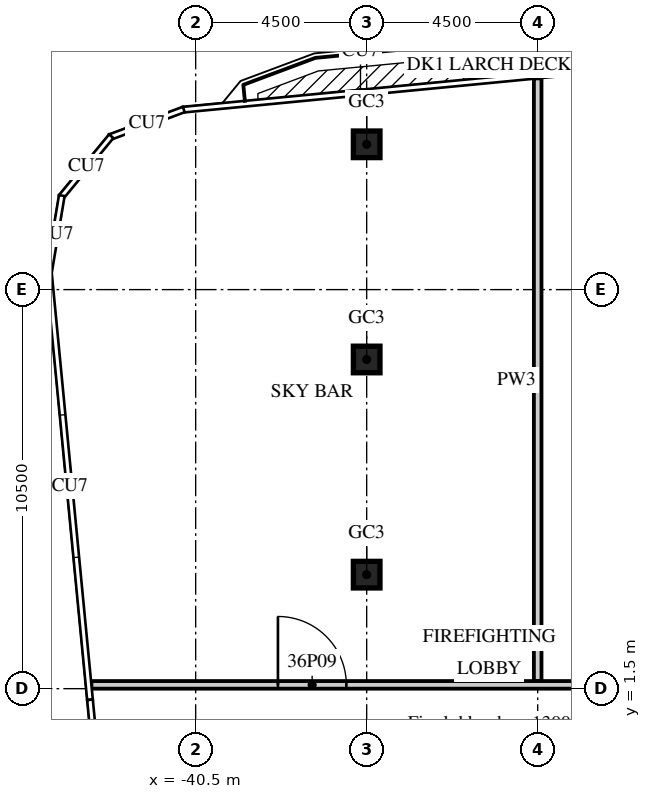
"""IFC4 building model, lengths in metres.
Left out: names, types, materials, properties, quantities, classifications, styles, units other than length and angle.
Written with IfcOpenShell. Run it as: python <this file> out.ifc"""

import sys

from ifc_helpers import new_model, si_unit, direction, frame, frame_2d, origin, origin_2d, place, context, subcontext, project, spatial, rectangle, extrude, element, fill, save


model = new_model("IFC4")
c1 = context("Model", 3, precision=1e-05, world=origin(), true_north=direction((0.0, 1.0)))
c2 = subcontext(c1, "Body", "Model", "MODEL_VIEW")
j1 = project(units=[si_unit("LENGTHUNIT", "METRE"), si_unit("PLANEANGLEUNIT", "RADIAN")], contexts=[c1])
p1 = place(None, origin())
s1 = spatial("IfcSite", under=j1, at=p1, CompositionType="ELEMENT")
p2 = place(p1, origin())
s2 = spatial("IfcBuilding", under=s1, at=p2, CompositionType="ELEMENT")
p3 = place(p2, frame((0.0, 0.0, 155.0)))
s3 = spatial("IfcBuildingStorey", under=s2, at=p3, CompositionType="ELEMENT", Elevation=155.0)
for number, where, z_axis, x_axis in (
    (1, (-36.0, 4.5, 0.0), (0.0, 0.0, 1.0), (1.0, 0.0, 0.0)),
    (2, (-36.0, 10.162, 0.0), (0.0, 0.0, 1.0), (1.0, 0.0, 0.0)),
    (3, (-36.0, 15.823, 0.0), (0.0, 0.0, 1.0), (1.0, 0.0, 0.0)),
):
    element("IfcColumn", number, at=place(p3, frame(where, z_axis=z_axis, x_axis=x_axis)), inside=s3, PredefinedType="COLUMN", context=c2, shape_type="SweptSolid", body=[
        extrude(rectangle(XDim=0.7, YDim=0.7, at=origin_2d()), origin(), (0.0, 0.0, 1.0), 7.4),
    ])
p4 = place(p3, frame((-31.5, 1.7, 0.0), z_axis=(0.0, 0.0, 1.0), x_axis=(0.0, 1.0, 0.0)))
e4 = element("IfcWall", 4, at=p4, inside=s3, PredefinedType="PARTITIONING", context=c2, shape_type="SweptSolid", body=[
    extrude(rectangle(XDim=15.858, YDim=0.2, at=frame_2d((7.929, 0.0))), origin(), (0.0, 0.0, 1.0), 7.0),
])
p5 = place(p3, frame((-43.243, 1.6, 0.0), z_axis=(0.0, 0.0, 1.0), x_axis=(1.0, 0.0, 0.0)))
e5 = element("IfcWall", 5, at=p5, inside=s3, PredefinedType="PARTITIONING", context=c2, shape_type="SweptSolid", body=[
    extrude(rectangle(XDim=56.543, YDim=0.2, at=frame_2d((28.272, 0.0))), origin(), (0.0, 0.0, 1.0), 7.0),
])
p6 = place(p5, frame((54.144, 0.0, 0.0)))
e6 = element("IfcOpeningElement", 6, at=p6, cuts=e5, PredefinedType="OPENING", context=c2, shape_type="SweptSolid", body=[
    extrude(rectangle(XDim=1.2, YDim=2.1, at=frame_2d((0.6, 1.05))), frame((0.0, 0.11, 0.0), z_axis=(0.0, -1.0, 0.0), x_axis=(1.0, 0.0, 0.0)), (0.0, 0.0, 1.0), 0.22),
])
p7 = place(p5, frame((36.003, 0.0, 0.0)))
e7 = element("IfcOpeningElement", 7, at=p7, cuts=e5, PredefinedType="OPENING", context=c2, shape_type="SweptSolid", body=[
    extrude(rectangle(XDim=1.8, YDim=2.1, at=frame_2d((0.9, 1.05))), frame((0.0, 0.11, 0.0), z_axis=(0.0, -1.0, 0.0), x_axis=(1.0, 0.0, 0.0)), (0.0, 0.0, 1.0), 0.22),
])
p8 = place(p5, frame((21.684, 0.0, 0.0)))
e8 = element("IfcOpeningElement", 8, at=p8, cuts=e5, PredefinedType="OPENING", context=c2, shape_type="SweptSolid", body=[
    extrude(rectangle(XDim=1.8, YDim=2.1, at=frame_2d((0.9, 1.05))), frame((0.0, 0.11, 0.0), z_axis=(0.0, -1.0, 0.0), x_axis=(1.0, 0.0, 0.0)), (0.0, 0.0, 1.0), 0.22),
])
p9 = place(p5, frame((4.908, 0.0, 0.0)))
e9 = element("IfcOpeningElement", 9, at=p9, cuts=e5, PredefinedType="OPENING", context=c2, shape_type="SweptSolid", body=[
    extrude(rectangle(XDim=1.8, YDim=2.1, at=frame_2d((0.9, 1.05))), frame((0.0, 0.11, 0.0), z_axis=(0.0, -1.0, 0.0), x_axis=(1.0, 0.0, 0.0)), (0.0, 0.0, 1.0), 0.22),
])
p10 = place(p9, origin())
e10 = element("IfcDoor", 10, at=p10, inside=s3, OperationType="DOUBLE_DOOR_DOUBLE_SWING", PredefinedType="DOOR", context=c2, shape_type="SweptSolid", body=[
    extrude(rectangle(XDim=1.8, YDim=2.1, at=frame_2d((0.9, 1.05))), frame((0.0, 0.025, 0.0), z_axis=(0.0, -1.0, 0.0), x_axis=(1.0, 0.0, 0.0)), (0.0, 0.0, 1.0), 0.05),
])
fill(e9, e10)
save(model, sys.argv[1])
